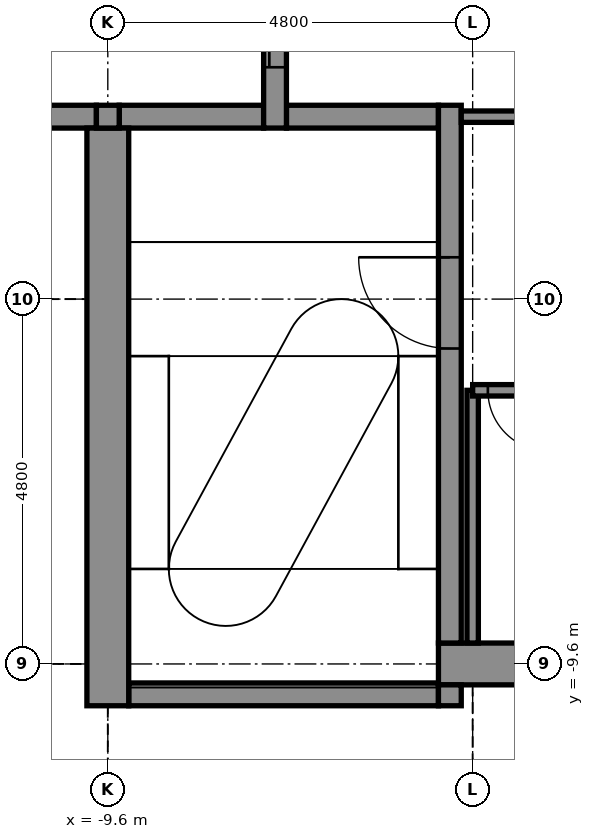
"""IFC4 building model, lengths in metres.
Left out: names, types, materials, properties, quantities, classifications, styles, units other than length and angle.
Written with IfcOpenShell. Run it as: python <this file> out.ifc"""

import sys

from ifc_helpers import new_model, si_unit, direction, frame, frame_2d, origin, place, context, subcontext, project, spatial, rectangle, extrude, element, fill, save


model = new_model("IFC4")
c1 = context("Model", 3, precision=1e-05, world=origin(), true_north=direction((0.0, 1.0)))
c2 = subcontext(c1, "Body", "Model", "MODEL_VIEW")
j1 = project(units=[si_unit("LENGTHUNIT", "METRE"), si_unit("PLANEANGLEUNIT", "RADIAN")], contexts=[c1])
p1 = place(None, origin())
s1 = spatial("IfcSite", under=j1, at=p1, CompositionType="ELEMENT")
p2 = place(p1, origin())
s2 = spatial("IfcBuilding", under=s1, at=p2, CompositionType="ELEMENT")
p3 = place(p2, frame((0.0, 0.0, 222.8)))
s3 = spatial("IfcBuildingStorey", under=s2, at=p3, CompositionType="ELEMENT", Elevation=222.8)
p4 = place(p3, frame((-9.325, -10.0, -0.15), z_axis=(0.0, 0.0, 1.0), x_axis=(1.0, 0.0, 0.0)))
e1 = element("IfcWall", 1, at=p4, inside=s3, PredefinedType="STANDARD", context=c2, shape_type="SweptSolid", body=[
    extrude(rectangle(XDim=4.075, YDim=0.3, at=frame_2d((2.038, 0.0))), origin(), (0.0, 0.0, 1.0), 3.9),
])
p5 = place(p3, frame((-5.25, -9.6, -0.15), z_axis=(0.0, 0.0, 1.0), x_axis=(1.0, 0.0, 0.0)))
e2 = element("IfcWall", 2, at=p5, inside=s3, PredefinedType="SHEAR", context=c2, shape_type="SweptSolid", body=[
    extrude(rectangle(XDim=10.2, YDim=0.55, at=frame_2d((5.1, 0.0))), origin(), (0.0, 0.0, 1.0), 3.9),
])
p6 = place(p5, frame((9.0, 0.0, 0.15)))
e3 = element("IfcOpeningElement", 3, at=p6, cuts=e2, PredefinedType="OPENING", context=c2, shape_type="SweptSolid", body=[
    extrude(rectangle(XDim=0.9, YDim=2.1, at=frame_2d((0.45, 1.05))), frame((0.0, 0.285, 0.0), z_axis=(0.0, -1.0, 0.0), x_axis=(1.0, 0.0, 0.0)), (0.0, 0.0, 1.0), 0.57),
])
p7 = place(p3, frame((-10.85, -2.4, -0.15), z_axis=(0.0, 0.0, 1.0), x_axis=(1.0, 0.0, 0.0)))
e4 = element("IfcWall", 4, at=p7, inside=s3, PredefinedType="STANDARD", context=c2, shape_type="SweptSolid", body=[
    extrude(rectangle(XDim=1.1, YDim=0.3, at=frame_2d((0.55, 0.0))), origin(), (0.0, 0.0, 1.0), 3.9),
])
p8 = place(p3, frame((-9.45, -2.4, -0.15), z_axis=(0.0, 0.0, 1.0), x_axis=(1.0, 0.0, 0.0)))
e5 = element("IfcWall", 5, at=p8, inside=s3, PredefinedType="STANDARD", context=c2, shape_type="SweptSolid", body=[
    extrude(rectangle(XDim=1.9, YDim=0.3, at=frame_2d((0.95, 0.0))), origin(), (0.0, 0.0, 1.0), 3.9),
])
p9 = place(p3, frame((-7.25, -2.4, -0.15), z_axis=(0.0, 0.0, 1.0), x_axis=(1.0, 0.0, 0.0)))
e6 = element("IfcWall", 6, at=p9, inside=s3, PredefinedType="STANDARD", context=c2, shape_type="SweptSolid", body=[
    extrude(rectangle(XDim=2.0, YDim=0.3, at=frame_2d((1.0, 0.0))), origin(), (0.0, 0.0, 1.0), 3.9),
])
p10 = place(p3, frame((-9.6, -10.15, -0.15), z_axis=(0.0, 0.0, 1.0), x_axis=(0.0, 1.0, 0.0)))
e7 = element("IfcWall", 7, at=p10, inside=s3, PredefinedType="SHEAR", context=c2, shape_type="SweptSolid", body=[
    extrude(rectangle(XDim=7.6, YDim=0.55, at=frame_2d((3.8, 0.0))), origin(), (0.0, 0.0, 1.0), 3.9),
])
p11 = place(p3, frame((-9.6, -2.55, -0.15), z_axis=(0.0, 0.0, 1.0), x_axis=(0.0, 1.0, 0.0)))
e8 = element("IfcWall", 8, at=p11, inside=s3, PredefinedType="STANDARD", context=c2, shape_type="SweptSolid", body=[
    extrude(rectangle(XDim=0.3, YDim=0.3, at=frame_2d((0.15, 0.0))), origin(), (0.0, 0.0, 1.0), 3.9),
])
p12 = place(p3, frame((-7.4, -2.55, -0.15), z_axis=(0.0, 0.0, 1.0), x_axis=(0.0, 1.0, 0.0)))
e9 = element("IfcWall", 9, at=p12, inside=s3, PredefinedType="STANDARD", context=c2, shape_type="SweptSolid", body=[
    extrude(rectangle(XDim=5.1, YDim=0.3, at=frame_2d((2.55, 0.0))), origin(), (0.0, 0.0, 1.0), 3.9),
])
p13 = place(p12, frame((0.8, 0.0, 0.15)))
e10 = element("IfcOpeningElement", 10, at=p13, cuts=e9, PredefinedType="OPENING", context=c2, shape_type="SweptSolid", body=[
    extrude(rectangle(XDim=1.1, YDim=2.1, at=frame_2d((0.55, 1.05))), frame((0.0, 0.16, 0.0), z_axis=(0.0, -1.0, 0.0), x_axis=(1.0, 0.0, 0.0)), (0.0, 0.0, 1.0), 0.32),
])
p14 = place(p12, frame((3.2, 0.0, 0.15)))
e11 = element("IfcOpeningElement", 11, at=p14, cuts=e9, PredefinedType="OPENING", context=c2, shape_type="SweptSolid", body=[
    extrude(rectangle(XDim=1.1, YDim=2.1, at=frame_2d((0.55, 1.05))), frame((0.0, 0.16, 0.0), z_axis=(0.0, -1.0, 0.0), x_axis=(1.0, 0.0, 0.0)), (0.0, 0.0, 1.0), 0.32),
])
p15 = place(p3, frame((-5.1, -10.15, -0.15), z_axis=(0.0, 0.0, 1.0), x_axis=(0.0, 1.0, 0.0)))
e12 = element("IfcWall", 12, at=p15, inside=s3, PredefinedType="STANDARD", context=c2, shape_type="SweptSolid", body=[
    extrude(rectangle(XDim=0.275, YDim=0.3, at=frame_2d((0.137, 0.0))), origin(), (0.0, 0.0, 1.0), 3.9),
])
p16 = place(p3, frame((-5.1, -9.325, -0.15), z_axis=(0.0, 0.0, 1.0), x_axis=(0.0, 1.0, 0.0)))
e13 = element("IfcWall", 13, at=p16, inside=s3, PredefinedType="STANDARD", context=c2, shape_type="SweptSolid", body=[
    extrude(rectangle(XDim=7.075, YDim=0.3, at=frame_2d((3.538, 0.0))), origin(), (0.0, 0.0, 1.0), 3.9),
])
p17 = place(p16, frame((3.875, 0.0, 0.15)))
e14 = element("IfcOpeningElement", 14, at=p17, cuts=e13, PredefinedType="OPENING", context=c2, shape_type="SweptSolid", body=[
    extrude(rectangle(XDim=1.2, YDim=2.1, at=frame_2d((0.6, 1.05))), frame((0.0, 0.16, 0.0), z_axis=(0.0, -1.0, 0.0), x_axis=(1.0, 0.0, 0.0)), (0.0, 0.0, 1.0), 0.32),
])
p18 = place(p3, frame((-4.8, -9.325, 0.0), z_axis=(0.0, 0.0, 1.0), x_axis=(0.0, 1.0, 0.0)))
e15 = element("IfcWall", 15, at=p18, inside=s3, PredefinedType="PARTITIONING", context=c2, shape_type="SweptSolid", body=[
    extrude(rectangle(XDim=3.325, YDim=0.15, at=frame_2d((1.663, 0.0))), origin(), (0.0, 0.0, 1.0), 3.75),
])
p19 = place(p3, frame((-4.8, -6.0, 0.0), z_axis=(0.0, 0.0, 1.0), x_axis=(1.0, 0.0, 0.0)))
e16 = element("IfcWall", 16, at=p19, inside=s3, PredefinedType="PARTITIONING", context=c2, shape_type="SweptSolid", body=[
    extrude(rectangle(XDim=1.05, YDim=0.15, at=frame_2d((0.525, 0.0))), origin(), (0.0, 0.0, 1.0), 3.75),
])
p20 = place(p19, frame((0.2, 0.0, 0.0)))
e17 = element("IfcOpeningElement", 17, at=p20, cuts=e16, PredefinedType="OPENING", context=c2, shape_type="SweptSolid", body=[
    extrude(rectangle(XDim=0.8, YDim=2.1, at=frame_2d((0.4, 1.05))), frame((0.0, 0.085, 0.0), z_axis=(0.0, -1.0, 0.0), x_axis=(1.0, 0.0, 0.0)), (0.0, 0.0, 1.0), 0.17),
])
p21 = place(p3, frame((-4.95, -2.4, 0.0), z_axis=(0.0, 0.0, 1.0), x_axis=(1.0, 0.0, 0.0)))
e18 = element("IfcWall", 18, at=p21, inside=s3, PredefinedType="PARTITIONING", context=c2, shape_type="SweptSolid", body=[
    extrude(rectangle(XDim=1.2, YDim=0.15, at=frame_2d((0.6, 0.0))), origin(), (0.0, 0.0, 1.0), 3.75),
])
p22 = place(p20, frame((0.8, 0.0, 0.0), z_axis=(0.0, 0.0, 1.0), x_axis=(-1.0, 0.0, 0.0)))
e19 = element("IfcDoor", 19, at=p22, inside=s3, OperationType="SINGLE_SWING_RIGHT", PredefinedType="DOOR", context=c2, shape_type="SweptSolid", body=[
    extrude(rectangle(XDim=0.8, YDim=2.1, at=frame_2d((0.4, 1.05))), frame((0.0, 0.025, 0.0), z_axis=(0.0, -1.0, 0.0), x_axis=(1.0, 0.0, 0.0)), (0.0, 0.0, 1.0), 0.05),
])
fill(e17, e19)
p23 = place(p13, origin())
e20 = element("IfcDoor", 20, at=p23, inside=s3, OperationType="DOUBLE_DOOR_SLIDING", PredefinedType="DOOR", context=c2, shape_type="SweptSolid", body=[
    extrude(rectangle(XDim=1.1, YDim=2.1, at=frame_2d((0.55, 1.05))), frame((0.0, 0.025, 0.0), z_axis=(0.0, -1.0, 0.0), x_axis=(1.0, 0.0, 0.0)), (0.0, 0.0, 1.0), 0.05),
])
fill(e10, e20)
p24 = place(p17, origin())
e21 = element("IfcDoor", 21, at=p24, inside=s3, OperationType="SINGLE_SWING_RIGHT", PredefinedType="DOOR", context=c2, shape_type="SweptSolid", body=[
    extrude(rectangle(XDim=1.2, YDim=2.1, at=frame_2d((0.6, 1.05))), frame((0.0, 0.025, 0.0), z_axis=(0.0, -1.0, 0.0), x_axis=(1.0, 0.0, 0.0)), (0.0, 0.0, 1.0), 0.05),
])
fill(e14, e21)
save(model, sys.argv[1])
